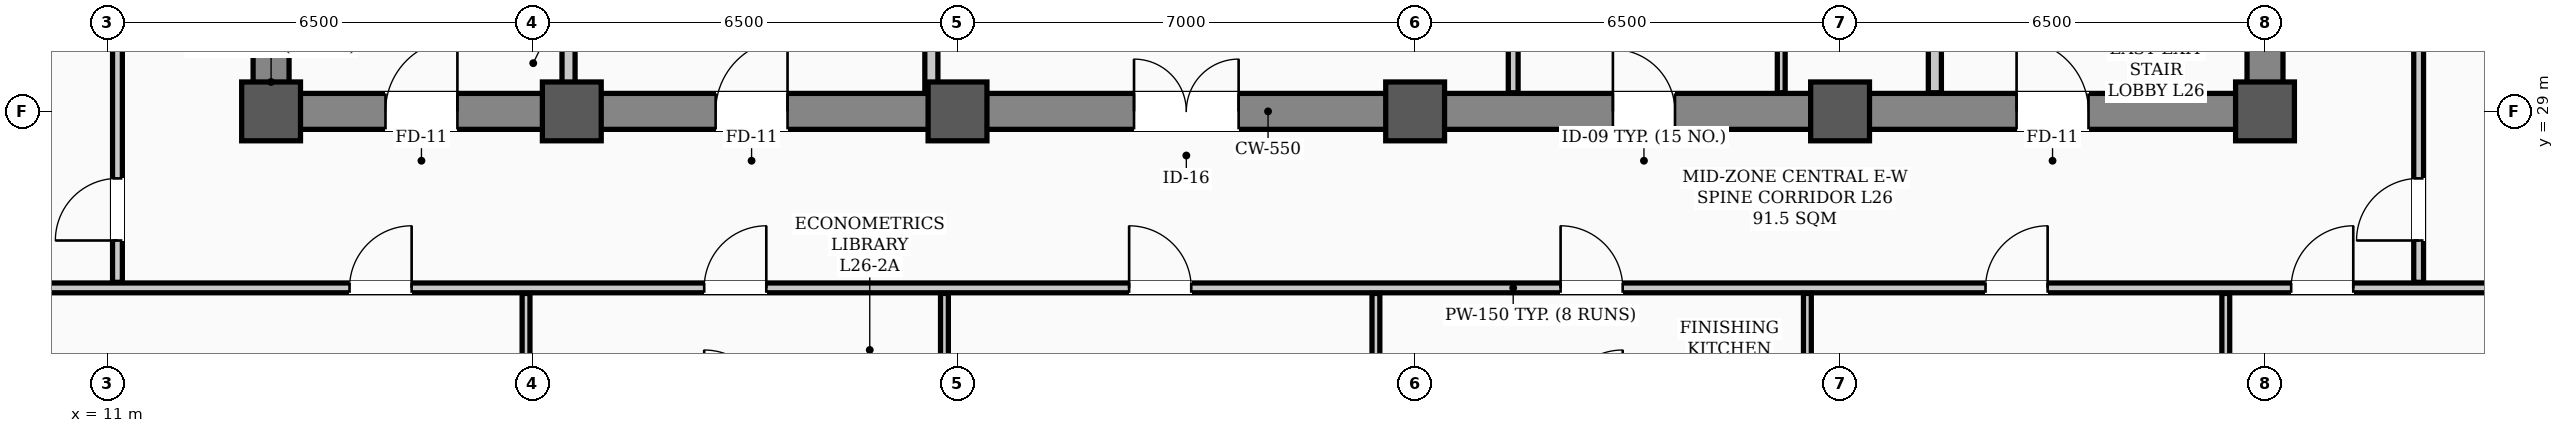
"""IFC4 building model, lengths in metres.
Left out: names, types, materials, properties, quantities, classifications, styles, units other than length and angle.
Written with IfcOpenShell. Run it as: python <this file> out.ifc"""

import sys

from ifc_helpers import new_model, si_unit, direction, frame, frame_2d, origin, origin_2d, place, context, subcontext, project, spatial, rectangle, hollow_rectangle, extrude, element, fill, save


model = new_model("IFC4")
c1 = context("Model", 3, precision=1e-05, world=origin(), true_north=direction((0.0, 1.0)))
c2 = subcontext(c1, "Body", "Model", "MODEL_VIEW")
j1 = project(units=[si_unit("LENGTHUNIT", "METRE"), si_unit("PLANEANGLEUNIT", "RADIAN")], contexts=[c1])
p1 = place(None, origin())
s1 = spatial("IfcSite", under=j1, at=p1, CompositionType="ELEMENT")
p2 = place(p1, origin())
s2 = spatial("IfcBuilding", under=s1, at=p2, CompositionType="ELEMENT")
p3 = place(p2, frame((0.0, 0.0, 106.0)))
s3 = spatial("IfcBuildingStorey", under=s2, at=p3, CompositionType="ELEMENT", Elevation=106.0)
for number, where, z_axis, x_axis in (
    (1, (13.5, 29.0, 0.0), (0.0, 0.0, 1.0), (1.0, 0.0, 0.0)),
    (2, (18.1, 29.0, 0.0), (0.0, 0.0, 1.0), (1.0, 0.0, 0.0)),
    (3, (24.0, 29.0, 0.0), (0.0, 0.0, 1.0), (1.0, 0.0, 0.0)),
    (4, (31.0, 29.0, 0.0), (0.0, 0.0, 1.0), (1.0, 0.0, 0.0)),
    (5, (37.5, 29.0, 0.0), (0.0, 0.0, 1.0), (1.0, 0.0, 0.0)),
    (6, (44.0, 29.0, 0.0), (0.0, 0.0, 1.0), (1.0, 0.0, 0.0)),
):
    element("IfcColumn", number, at=place(p3, frame(where, z_axis=z_axis, x_axis=x_axis)), inside=s3, PredefinedType="COLUMN", context=c2, shape_type="SweptSolid", body=[
        extrude(hollow_rectangle(XDim=0.9, YDim=0.9, WallThickness=0.035, InnerFilletRadius=0.017, OuterFilletRadius=0.052, at=origin_2d()), origin(), (0.0, 0.0, 1.0), 5.0),
    ])
p4 = place(p3, frame((13.5, 29.0, 0.0), z_axis=(0.0, 0.0, 1.0), x_axis=(1.0, 0.0, 0.0)))
e7 = element("IfcWall", 7, at=p4, inside=s3, PredefinedType="SHEAR", context=c2, shape_type="SweptSolid", body=[
    extrude(rectangle(XDim=30.5, YDim=0.55, at=frame_2d((15.25, 0.0))), origin(), (0.0, 0.0, 1.0), 4.82),
])
p5 = place(p4, frame((1.75, 0.0, 0.0)))
e8 = element("IfcOpeningElement", 8, at=p5, cuts=e7, PredefinedType="OPENING", context=c2, shape_type="SweptSolid", body=[
    extrude(rectangle(XDim=1.1, YDim=2.08, at=frame_2d((0.55, 1.04))), frame((0.0, 0.285, 0.0), z_axis=(0.0, -1.0, 0.0), x_axis=(1.0, 0.0, 0.0)), (0.0, 0.0, 1.0), 0.57),
])
p6 = place(p4, frame((26.7, 0.0, 0.0)))
e9 = element("IfcOpeningElement", 9, at=p6, cuts=e7, PredefinedType="OPENING", context=c2, shape_type="SweptSolid", body=[
    extrude(rectangle(XDim=1.1, YDim=2.08, at=frame_2d((0.55, 1.04))), frame((0.0, 0.285, 0.0), z_axis=(0.0, -1.0, 0.0), x_axis=(1.0, 0.0, 0.0)), (0.0, 0.0, 1.0), 0.57),
])
p7 = place(p4, frame((6.8, 0.0, 0.0)))
e10 = element("IfcOpeningElement", 10, at=p7, cuts=e7, PredefinedType="OPENING", context=c2, shape_type="SweptSolid", body=[
    extrude(rectangle(XDim=1.1, YDim=2.08, at=frame_2d((0.55, 1.04))), frame((0.0, 0.285, 0.0), z_axis=(0.0, -1.0, 0.0), x_axis=(1.0, 0.0, 0.0)), (0.0, 0.0, 1.0), 0.57),
])
p8 = place(p4, frame((13.2, 0.0, 0.0)))
e11 = element("IfcOpeningElement", 11, at=p8, cuts=e7, PredefinedType="OPENING", context=c2, shape_type="SweptSolid", body=[
    extrude(rectangle(XDim=1.6, YDim=2.08, at=frame_2d((0.8, 1.04))), frame((0.0, 0.285, 0.0), z_axis=(0.0, -1.0, 0.0), x_axis=(1.0, 0.0, 0.0)), (0.0, 0.0, 1.0), 0.57),
])
p9 = place(p4, frame((20.525, 0.0, 0.0)))
e12 = element("IfcOpeningElement", 12, at=p9, cuts=e7, PredefinedType="OPENING", context=c2, shape_type="SweptSolid", body=[
    extrude(rectangle(XDim=0.95, YDim=2.08, at=frame_2d((0.475, 1.04))), frame((0.0, 0.285, 0.0), z_axis=(0.0, -1.0, 0.0), x_axis=(1.0, 0.0, 0.0)), (0.0, 0.0, 1.0), 0.57),
])
for number, where, z_axis, x_axis in (
    (13, (13.5, 29.35, 0.0), (0.0, 0.0, 1.0), (0.0, 1.0, 0.0)),
    (14, (44.0, 29.35, 0.0), (0.0, 0.0, 1.0), (0.0, 1.0, 0.0)),
):
    element("IfcWall", number, at=place(p3, frame(where, z_axis=z_axis, x_axis=x_axis)), inside=s3, PredefinedType="SHEAR", context=c2, shape_type="SweptSolid", body=[
        extrude(rectangle(XDim=8.6, YDim=0.55, at=frame_2d((4.3, 0.0))), origin(), (0.0, 0.0, 1.0), 4.82),
    ])
p10 = place(p3, frame((7.81, 26.3, 0.0), z_axis=(0.0, 0.0, 1.0), x_axis=(1.0, 0.0, 0.0)))
e15 = element("IfcWall", 15, at=p10, inside=s3, PredefinedType="PARTITIONING", context=c2, shape_type="SweptSolid", body=[
    extrude(rectangle(XDim=49.38, YDim=0.15, at=frame_2d((24.69, 0.0))), origin(), (0.0, 0.0, 1.0), 4.2),
])
p11 = place(p10, frame((6.89, 0.0, 0.0)))
e16 = element("IfcOpeningElement", 16, at=p11, cuts=e15, PredefinedType="OPENING", context=c2, shape_type="SweptSolid", body=[
    extrude(rectangle(XDim=0.95, YDim=2.08, at=frame_2d((0.475, 1.04))), frame((0.0, 0.085, 0.0), z_axis=(0.0, -1.0, 0.0), x_axis=(1.0, 0.0, 0.0)), (0.0, 0.0, 1.0), 0.17),
])
p12 = place(p10, frame((12.315, 0.0, 0.0)))
e17 = element("IfcOpeningElement", 17, at=p12, cuts=e15, PredefinedType="OPENING", context=c2, shape_type="SweptSolid", body=[
    extrude(rectangle(XDim=0.95, YDim=2.08, at=frame_2d((0.475, 1.04))), frame((0.0, 0.085, 0.0), z_axis=(0.0, -1.0, 0.0), x_axis=(1.0, 0.0, 0.0)), (0.0, 0.0, 1.0), 0.17),
])
p13 = place(p10, frame((18.815, 0.0, 0.0)))
e18 = element("IfcOpeningElement", 18, at=p13, cuts=e15, PredefinedType="OPENING", context=c2, shape_type="SweptSolid", body=[
    extrude(rectangle(XDim=0.95, YDim=2.08, at=frame_2d((0.475, 1.04))), frame((0.0, 0.085, 0.0), z_axis=(0.0, -1.0, 0.0), x_axis=(1.0, 0.0, 0.0)), (0.0, 0.0, 1.0), 0.17),
])
p14 = place(p10, frame((25.415, 0.0, 0.0)))
e19 = element("IfcOpeningElement", 19, at=p14, cuts=e15, PredefinedType="OPENING", context=c2, shape_type="SweptSolid", body=[
    extrude(rectangle(XDim=0.95, YDim=2.08, at=frame_2d((0.475, 1.04))), frame((0.0, 0.085, 0.0), z_axis=(0.0, -1.0, 0.0), x_axis=(1.0, 0.0, 0.0)), (0.0, 0.0, 1.0), 0.17),
])
p15 = place(p10, frame((31.915, 0.0, 0.0)))
e20 = element("IfcOpeningElement", 20, at=p15, cuts=e15, PredefinedType="OPENING", context=c2, shape_type="SweptSolid", body=[
    extrude(rectangle(XDim=0.95, YDim=2.08, at=frame_2d((0.475, 1.04))), frame((0.0, 0.085, 0.0), z_axis=(0.0, -1.0, 0.0), x_axis=(1.0, 0.0, 0.0)), (0.0, 0.0, 1.0), 0.17),
])
p16 = place(p10, frame((36.59, 0.0, 0.0)))
e21 = element("IfcOpeningElement", 21, at=p16, cuts=e15, PredefinedType="OPENING", context=c2, shape_type="SweptSolid", body=[
    extrude(rectangle(XDim=0.95, YDim=2.08, at=frame_2d((0.475, 1.04))), frame((0.0, 0.085, 0.0), z_axis=(0.0, -1.0, 0.0), x_axis=(1.0, 0.0, 0.0)), (0.0, 0.0, 1.0), 0.17),
])
for number, where, z_axis, x_axis in (
    (22, (18.05, 29.285, 0.0), (0.0, 0.0, 1.0), (0.0, 1.0, 0.0)),
    (23, (38.95, 29.285, 0.0), (0.0, 0.0, 1.0), (0.0, 1.0, 0.0)),
):
    element("IfcWall", number, at=place(p3, frame(where, z_axis=z_axis, x_axis=x_axis)), inside=s3, PredefinedType="STANDARD", context=c2, shape_type="SweptSolid", body=[
        extrude(rectangle(XDim=1.015, YDim=0.2, at=frame_2d((0.508, 0.0))), origin(), (0.0, 0.0, 1.0), 4.4),
    ])
p17 = place(p3, frame((23.6, 29.285, 0.0), z_axis=(0.0, 0.0, 1.0), x_axis=(0.0, 1.0, 0.0)))
e24 = element("IfcWall", 24, at=p17, inside=s3, PredefinedType="STANDARD", context=c2, shape_type="SweptSolid", body=[
    extrude(rectangle(XDim=5.415, YDim=0.2, at=frame_2d((2.708, 0.0))), origin(), (0.0, 0.0, 1.0), 4.2),
])
p18 = place(p3, frame((32.5, 29.285, 0.0), z_axis=(0.0, 0.0, 1.0), x_axis=(0.0, 1.0, 0.0)))
e25 = element("IfcWall", 25, at=p18, inside=s3, PredefinedType="PARTITIONING", context=c2, shape_type="SweptSolid", body=[
    extrude(rectangle(XDim=2.48, YDim=0.15, at=frame_2d((1.24, 0.0))), origin(), (0.0, 0.0, 1.0), 4.4),
])
p19 = place(p3, frame((36.6, 29.285, 0.0), z_axis=(0.0, 0.0, 1.0), x_axis=(0.0, 1.0, 0.0)))
e26 = element("IfcWall", 26, at=p19, inside=s3, PredefinedType="PARTITIONING", context=c2, shape_type="SweptSolid", body=[
    extrude(rectangle(XDim=2.48, YDim=0.12, at=frame_2d((1.24, 0.0))), origin(), (0.0, 0.0, 1.0), 4.4),
])
p20 = place(p3, frame((11.15, 26.385, 0.0), z_axis=(0.0, 0.0, 1.0), x_axis=(0.0, 1.0, 0.0)))
e27 = element("IfcWall", 27, at=p20, inside=s3, PredefinedType="PARTITIONING", context=c2, shape_type="SweptSolid", body=[
    extrude(rectangle(XDim=11.83, YDim=0.15, at=frame_2d((5.915, 0.0))), origin(), (0.0, 0.0, 1.0), 4.1),
])
p21 = place(p20, frame((0.64, 0.0, 0.0)))
e28 = element("IfcOpeningElement", 28, at=p21, cuts=e27, PredefinedType="OPENING", context=c2, shape_type="SweptSolid", body=[
    extrude(rectangle(XDim=0.95, YDim=2.08, at=frame_2d((0.475, 1.04))), frame((0.0, 0.085, 0.0), z_axis=(0.0, -1.0, 0.0), x_axis=(1.0, 0.0, 0.0)), (0.0, 0.0, 1.0), 0.17),
])
p22 = place(p20, frame((8.29, 0.0, 0.0)))
e29 = element("IfcOpeningElement", 29, at=p22, cuts=e27, PredefinedType="OPENING", context=c2, shape_type="SweptSolid", body=[
    extrude(rectangle(XDim=0.95, YDim=2.08, at=frame_2d((0.475, 1.04))), frame((0.0, 0.085, 0.0), z_axis=(0.0, -1.0, 0.0), x_axis=(1.0, 0.0, 0.0)), (0.0, 0.0, 1.0), 0.17),
])
p23 = place(p3, frame((46.35, 26.385, 0.0), z_axis=(0.0, 0.0, 1.0), x_axis=(0.0, 1.0, 0.0)))
e30 = element("IfcWall", 30, at=p23, inside=s3, PredefinedType="PARTITIONING", context=c2, shape_type="SweptSolid", body=[
    extrude(rectangle(XDim=11.83, YDim=0.15, at=frame_2d((5.915, 0.0))), origin(), (0.0, 0.0, 1.0), 4.1),
])
p24 = place(p23, frame((0.64, 0.0, 0.0)))
e31 = element("IfcOpeningElement", 31, at=p24, cuts=e30, PredefinedType="OPENING", context=c2, shape_type="SweptSolid", body=[
    extrude(rectangle(XDim=0.95, YDim=2.08, at=frame_2d((0.475, 1.04))), frame((0.0, 0.085, 0.0), z_axis=(0.0, -1.0, 0.0), x_axis=(1.0, 0.0, 0.0)), (0.0, 0.0, 1.0), 0.17),
])
p25 = place(p23, frame((8.29, 0.0, 0.0)))
e32 = element("IfcOpeningElement", 32, at=p25, cuts=e30, PredefinedType="OPENING", context=c2, shape_type="SweptSolid", body=[
    extrude(rectangle(XDim=0.95, YDim=2.08, at=frame_2d((0.475, 1.04))), frame((0.0, 0.085, 0.0), z_axis=(0.0, -1.0, 0.0), x_axis=(1.0, 0.0, 0.0)), (0.0, 0.0, 1.0), 0.17),
])
p26 = place(p3, frame((17.4, 9.81, 0.0), z_axis=(0.0, 0.0, 1.0), x_axis=(0.0, 1.0, 0.0)))
e33 = element("IfcWall", 33, at=p26, inside=s3, PredefinedType="PARTITIONING", context=c2, shape_type="SweptSolid", body=[
    extrude(rectangle(XDim=16.405, YDim=0.12, at=frame_2d((8.203, 0.0))), origin(), (0.0, 0.0, 1.0), 4.1),
])
p27 = place(p3, frame((23.8, 11.57, 0.0), z_axis=(0.0, 0.0, 1.0), x_axis=(0.0, 1.0, 0.0)))
e34 = element("IfcWall", 34, at=p27, inside=s3, PredefinedType="PARTITIONING", context=c2, shape_type="SweptSolid", body=[
    extrude(rectangle(XDim=14.645, YDim=0.12, at=frame_2d((7.323, 0.0))), origin(), (0.0, 0.0, 1.0), 4.1),
])
for number, where, z_axis, x_axis in (
    (35, (30.4, 9.81, 0.0), (0.0, 0.0, 1.0), (0.0, 1.0, 0.0)),
    (36, (37.0, 9.81, 0.0), (0.0, 0.0, 1.0), (0.0, 1.0, 0.0)),
    (37, (43.4, 9.81, 0.0), (0.0, 0.0, 1.0), (0.0, 1.0, 0.0)),
):
    element("IfcWall", number, at=place(p3, frame(where, z_axis=z_axis, x_axis=x_axis)), inside=s3, PredefinedType="PARTITIONING", context=c2, shape_type="SweptSolid", body=[
        extrude(rectangle(XDim=16.405, YDim=0.12, at=frame_2d((8.203, 0.0))), origin(), (0.0, 0.0, 1.0), 4.1),
    ])
p28 = place(p5, origin())
e38 = element("IfcDoor", 38, at=p28, inside=s3, OperationType="SINGLE_SWING_RIGHT", PredefinedType="DOOR", context=c2, shape_type="SweptSolid", body=[
    extrude(rectangle(XDim=1.1, YDim=2.08, at=frame_2d((0.55, 1.04))), frame((0.0, 0.025, 0.0), z_axis=(0.0, -1.0, 0.0), x_axis=(1.0, 0.0, 0.0)), (0.0, 0.0, 1.0), 0.05),
])
fill(e8, e38)
p29 = place(p6, origin())
e39 = element("IfcDoor", 39, at=p29, inside=s3, OperationType="SINGLE_SWING_LEFT", PredefinedType="DOOR", context=c2, shape_type="SweptSolid", body=[
    extrude(rectangle(XDim=1.1, YDim=2.08, at=frame_2d((0.55, 1.04))), frame((0.0, 0.025, 0.0), z_axis=(0.0, -1.0, 0.0), x_axis=(1.0, 0.0, 0.0)), (0.0, 0.0, 1.0), 0.05),
])
fill(e9, e39)
p30 = place(p7, origin())
e40 = element("IfcDoor", 40, at=p30, inside=s3, OperationType="SINGLE_SWING_RIGHT", PredefinedType="DOOR", context=c2, shape_type="SweptSolid", body=[
    extrude(rectangle(XDim=1.1, YDim=2.08, at=frame_2d((0.55, 1.04))), frame((0.0, 0.025, 0.0), z_axis=(0.0, -1.0, 0.0), x_axis=(1.0, 0.0, 0.0)), (0.0, 0.0, 1.0), 0.05),
])
fill(e10, e40)
p31 = place(p8, origin())
e41 = element("IfcDoor", 41, at=p31, inside=s3, OperationType="DOUBLE_DOOR_SINGLE_SWING", PredefinedType="DOOR", context=c2, shape_type="SweptSolid", body=[
    extrude(rectangle(XDim=1.6, YDim=2.08, at=frame_2d((0.8, 1.04))), frame((0.0, 0.025, 0.0), z_axis=(0.0, -1.0, 0.0), x_axis=(1.0, 0.0, 0.0)), (0.0, 0.0, 1.0), 0.05),
])
fill(e11, e41)
p32 = place(p9, origin())
e42 = element("IfcDoor", 42, at=p32, inside=s3, OperationType="SINGLE_SWING_LEFT", PredefinedType="DOOR", context=c2, shape_type="SweptSolid", body=[
    extrude(rectangle(XDim=0.95, YDim=2.08, at=frame_2d((0.475, 1.04))), frame((0.0, 0.025, 0.0), z_axis=(0.0, -1.0, 0.0), x_axis=(1.0, 0.0, 0.0)), (0.0, 0.0, 1.0), 0.05),
])
fill(e12, e42)
p33 = place(p11, origin())
e43 = element("IfcDoor", 43, at=p33, inside=s3, OperationType="SINGLE_SWING_RIGHT", PredefinedType="DOOR", context=c2, shape_type="SweptSolid", body=[
    extrude(rectangle(XDim=0.95, YDim=2.08, at=frame_2d((0.475, 1.04))), frame((0.0, 0.025, 0.0), z_axis=(0.0, -1.0, 0.0), x_axis=(1.0, 0.0, 0.0)), (0.0, 0.0, 1.0), 0.05),
])
fill(e16, e43)
p34 = place(p12, origin())
e44 = element("IfcDoor", 44, at=p34, inside=s3, OperationType="SINGLE_SWING_RIGHT", PredefinedType="DOOR", context=c2, shape_type="SweptSolid", body=[
    extrude(rectangle(XDim=0.95, YDim=2.08, at=frame_2d((0.475, 1.04))), frame((0.0, 0.025, 0.0), z_axis=(0.0, -1.0, 0.0), x_axis=(1.0, 0.0, 0.0)), (0.0, 0.0, 1.0), 0.05),
])
fill(e17, e44)
p35 = place(p13, origin())
e45 = element("IfcDoor", 45, at=p35, inside=s3, OperationType="SINGLE_SWING_LEFT", PredefinedType="DOOR", context=c2, shape_type="SweptSolid", body=[
    extrude(rectangle(XDim=0.95, YDim=2.08, at=frame_2d((0.475, 1.04))), frame((0.0, 0.025, 0.0), z_axis=(0.0, -1.0, 0.0), x_axis=(1.0, 0.0, 0.0)), (0.0, 0.0, 1.0), 0.05),
])
fill(e18, e45)
p36 = place(p14, origin())
e46 = element("IfcDoor", 46, at=p36, inside=s3, OperationType="SINGLE_SWING_LEFT", PredefinedType="DOOR", context=c2, shape_type="SweptSolid", body=[
    extrude(rectangle(XDim=0.95, YDim=2.08, at=frame_2d((0.475, 1.04))), frame((0.0, 0.025, 0.0), z_axis=(0.0, -1.0, 0.0), x_axis=(1.0, 0.0, 0.0)), (0.0, 0.0, 1.0), 0.05),
])
fill(e19, e46)
p37 = place(p15, origin())
e47 = element("IfcDoor", 47, at=p37, inside=s3, OperationType="SINGLE_SWING_RIGHT", PredefinedType="DOOR", context=c2, shape_type="SweptSolid", body=[
    extrude(rectangle(XDim=0.95, YDim=2.08, at=frame_2d((0.475, 1.04))), frame((0.0, 0.025, 0.0), z_axis=(0.0, -1.0, 0.0), x_axis=(1.0, 0.0, 0.0)), (0.0, 0.0, 1.0), 0.05),
])
fill(e20, e47)
p38 = place(p16, origin())
e48 = element("IfcDoor", 48, at=p38, inside=s3, OperationType="SINGLE_SWING_RIGHT", PredefinedType="DOOR", context=c2, shape_type="SweptSolid", body=[
    extrude(rectangle(XDim=0.95, YDim=2.08, at=frame_2d((0.475, 1.04))), frame((0.0, 0.025, 0.0), z_axis=(0.0, -1.0, 0.0), x_axis=(1.0, 0.0, 0.0)), (0.0, 0.0, 1.0), 0.05),
])
fill(e21, e48)
p39 = place(p21, origin())
e49 = element("IfcDoor", 49, at=p39, inside=s3, OperationType="SINGLE_SWING_LEFT", PredefinedType="DOOR", context=c2, shape_type="SweptSolid", body=[
    extrude(rectangle(XDim=0.95, YDim=2.08, at=frame_2d((0.475, 1.04))), frame((0.0, 0.025, 0.0), z_axis=(0.0, -1.0, 0.0), x_axis=(1.0, 0.0, 0.0)), (0.0, 0.0, 1.0), 0.05),
])
fill(e28, e49)
p40 = place(p24, origin())
e50 = element("IfcDoor", 50, at=p40, inside=s3, OperationType="SINGLE_SWING_LEFT", PredefinedType="DOOR", context=c2, shape_type="SweptSolid", body=[
    extrude(rectangle(XDim=0.95, YDim=2.08, at=frame_2d((0.475, 1.04))), frame((0.0, 0.025, 0.0), z_axis=(0.0, -1.0, 0.0), x_axis=(1.0, 0.0, 0.0)), (0.0, 0.0, 1.0), 0.05),
])
fill(e31, e50)
save(model, sys.argv[1])
